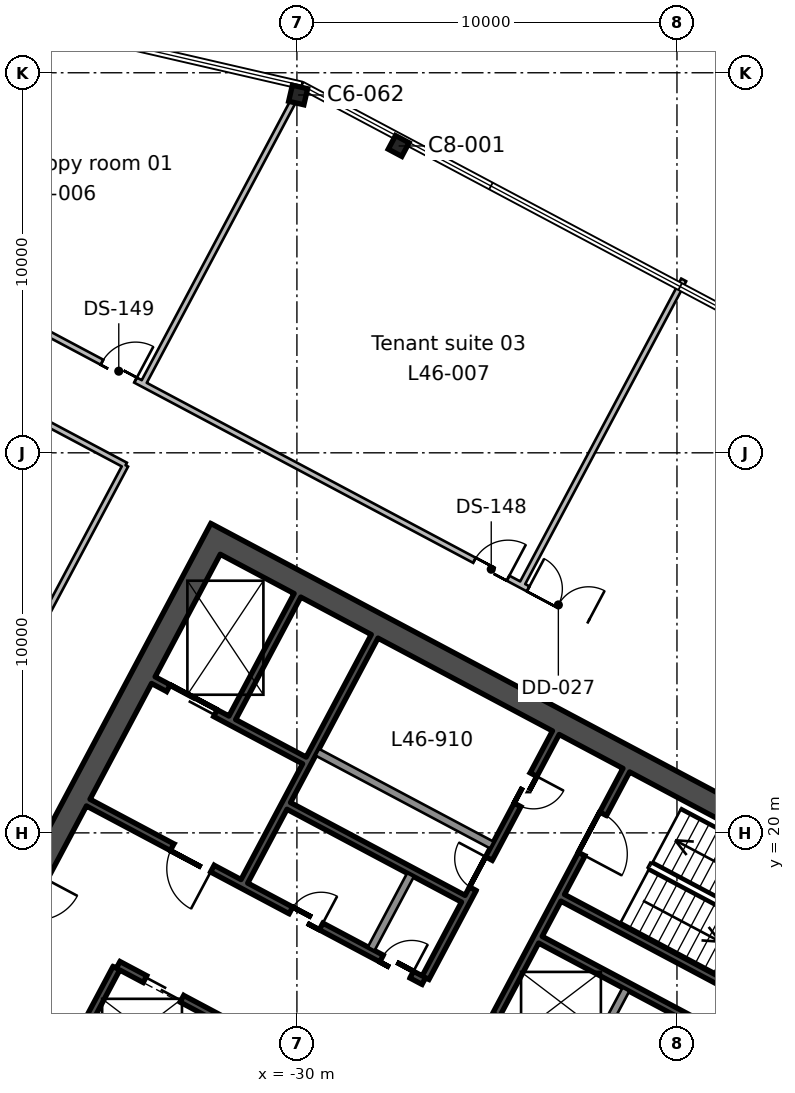
"""IFC4 building model, lengths in metres.
Left out: names, types, materials, properties, quantities, classifications, styles, units other than length and angle.
Written with IfcOpenShell. Run it as: python <this file> out.ifc"""

import sys

from ifc_helpers import new_model, si_unit, direction, frame, frame_2d, origin, origin_2d, place, context, subcontext, project, spatial, rectangle, i_section, extrude, element, fill, save


model = new_model("IFC4")
c1 = context("Model", 3, precision=1e-05, world=origin(), true_north=direction((0.0, 1.0)))
c2 = subcontext(c1, "Body", "Model", "MODEL_VIEW")
j1 = project(units=[si_unit("LENGTHUNIT", "METRE"), si_unit("PLANEANGLEUNIT", "RADIAN")], contexts=[c1])
p1 = place(None, origin())
s1 = spatial("IfcSite", under=j1, at=p1, CompositionType="ELEMENT")
p2 = place(p1, origin())
s2 = spatial("IfcBuilding", under=s1, at=p2, CompositionType="ELEMENT")
p3 = place(p2, frame((0.0, 0.0, 213.0)))
s3 = spatial("IfcBuildingStorey", under=s2, at=p3, CompositionType="ELEMENT", Elevation=213.0)
p4 = place(p3, frame((-27.323, 38.074, 0.0), z_axis=(0.0, 0.0, 1.0), x_axis=(-0.882947592859, 0.469471562786, 0.0)))
e1 = element("IfcColumn", 1, at=p4, inside=s3, PredefinedType="COLUMN", context=c2, shape_type="SweptSolid", body=[
    extrude(i_section(OverallWidth=0.404, OverallDepth=0.406, WebThickness=0.027, FlangeThickness=0.044, FilletRadius=0.015, at=origin_2d()), origin(), (0.0, 0.0, 1.0), 3.9),
])
p5 = place(p3, frame((-29.968, 39.415, 0.0), z_axis=(0.0, 0.0, 1.0), x_axis=(-0.974370064785, 0.224951054344, 0.0)))
e2 = element("IfcColumn", 2, at=p5, inside=s3, PredefinedType="COLUMN", context=c2, shape_type="SweptSolid", body=[
    extrude(i_section(OverallWidth=0.412, OverallDepth=0.434, WebThickness=0.036, FlangeThickness=0.057, FilletRadius=0.015, at=origin_2d()), origin(), (0.0, 0.0, 1.0), 3.9),
])
p6 = place(p3, frame((-13.635, 18.236, 0.0), z_axis=(0.0, 0.0, 1.0), x_axis=(-0.469478769487, -0.88294376095, 0.0)))
e3 = element("IfcWall", 3, at=p6, inside=s3, PredefinedType="SHEAR", context=c2, shape_type="SweptSolid", body=[
    extrude(rectangle(XDim=19.4, YDim=0.6, at=frame_2d((9.7, 0.0))), origin(), (0.0, 0.0, 1.0), 3.9),
])
p7 = place(p6, frame((6.7, 0.0, 0.0)))
e4 = element("IfcOpeningElement", 4, at=p7, cuts=e3, PredefinedType="OPENING", context=c2, shape_type="SweptSolid", body=[
    extrude(rectangle(XDim=2.4, YDim=2.4, at=frame_2d((1.2, 1.2))), frame((0.0, 0.31, 0.0), z_axis=(0.0, -1.0, 0.0), x_axis=(1.0, 0.0, 0.0)), (0.0, 0.0, 1.0), 0.62),
])
p8 = place(p3, frame((-32.0, 28.001, 0.0), z_axis=(0.0, 0.0, 1.0), x_axis=(-0.469468958625, -0.882948977511, 0.0)))
e5 = element("IfcWall", 5, at=p8, inside=s3, PredefinedType="SHEAR", context=c2, shape_type="SweptSolid", body=[
    extrude(rectangle(XDim=19.4, YDim=0.6, at=frame_2d((9.7, 0.0))), origin(), (0.0, 0.0, 1.0), 3.9),
])
p9 = place(p8, frame((10.3, 0.0, 0.0)))
e6 = element("IfcOpeningElement", 6, at=p9, cuts=e5, PredefinedType="OPENING", context=c2, shape_type="SweptSolid", body=[
    extrude(rectangle(XDim=2.4, YDim=2.4, at=frame_2d((1.2, 1.2))), frame((0.0, 0.31, 0.0), z_axis=(0.0, -1.0, 0.0), x_axis=(1.0, 0.0, 0.0)), (0.0, 0.0, 1.0), 0.62),
])
p10 = place(p3, frame((-14.041, 18.112, 0.0), z_axis=(0.0, 0.0, 1.0), x_axis=(-0.882947755831, 0.46947125628, 0.0)))
e7 = element("IfcWall", 7, at=p10, inside=s3, PredefinedType="SHEAR", context=c2, shape_type="SweptSolid", body=[
    extrude(rectangle(XDim=20.2, YDim=0.6, at=frame_2d((10.1, 0.0))), origin(), (0.0, 0.0, 1.0), 3.9),
])
p11 = place(p3, frame((-21.344, 15.879, 0.0), z_axis=(0.0, 0.0, 1.0), x_axis=(-0.4694473164, -0.882960484464, 0.0)))
e8 = element("IfcWall", 8, at=p11, inside=s3, PredefinedType="SOLIDWALL", context=c2, shape_type="SweptSolid", body=[
    extrude(rectangle(XDim=2.2, YDim=0.2, at=frame_2d((1.1, 0.0))), origin(), (0.0, 0.0, 1.0), 3.9),
])
p12 = place(p3, frame((-21.333, 21.649, 0.0), z_axis=(0.0, 0.0, 1.0), x_axis=(-0.469494272526, -0.882935517501, 0.0)))
e9 = element("IfcWall", 9, at=p12, inside=s3, PredefinedType="SHEAR", context=c2, shape_type="SweptSolid", body=[
    extrude(rectangle(XDim=7.3, YDim=0.2, at=frame_2d((3.65, 0.0))), origin(), (0.0, 0.0, 1.0), 3.9),
])
p13 = place(p12, frame((1.3, 0.0, 0.0)))
e10 = element("IfcOpeningElement", 10, at=p13, cuts=e9, PredefinedType="OPENING", context=c2, shape_type="SweptSolid", body=[
    extrude(rectangle(XDim=1.2, YDim=2.1, at=frame_2d((0.6, 1.05))), frame((0.0, 0.11, 0.0), z_axis=(0.0, -1.0, 0.0), x_axis=(1.0, 0.0, 0.0)), (0.0, 0.0, 1.0), 0.22),
])
p14 = place(p3, frame((-23.188, 22.635, 0.0), z_axis=(0.0, 0.0, 1.0), x_axis=(-0.469454336211, -0.882956752176, 0.0)))
e11 = element("IfcWall", 11, at=p14, inside=s3, PredefinedType="SHEAR", context=c2, shape_type="SweptSolid", body=[
    extrude(rectangle(XDim=7.3, YDim=0.2, at=frame_2d((3.65, 0.0))), origin(), (0.0, 0.0, 1.0), 3.9),
])
p15 = place(p14, frame((1.25, 0.0, 0.0)))
e12 = element("IfcOpeningElement", 12, at=p15, cuts=e11, PredefinedType="OPENING", context=c2, shape_type="SweptSolid", body=[
    extrude(rectangle(XDim=0.9, YDim=2.1, at=frame_2d((0.45, 1.05))), frame((0.0, 0.11, 0.0), z_axis=(0.0, -1.0, 0.0), x_axis=(1.0, 0.0, 0.0)), (0.0, 0.0, 1.0), 0.22),
])
p16 = place(p14, frame((3.75, 0.0, 0.0)))
e13 = element("IfcOpeningElement", 13, at=p16, cuts=e11, PredefinedType="OPENING", context=c2, shape_type="SweptSolid", body=[
    extrude(rectangle(XDim=0.9, YDim=2.1, at=frame_2d((0.45, 1.05))), frame((0.0, 0.11, 0.0), z_axis=(0.0, -1.0, 0.0), x_axis=(1.0, 0.0, 0.0)), (0.0, 0.0, 1.0), 0.22),
])
p17 = place(p3, frame((-27.012, 18.893, 0.0), z_axis=(0.0, 0.0, 1.0), x_axis=(-0.4694473164, -0.882960484464, 0.0)))
e14 = element("IfcWall", 14, at=p17, inside=s3, PredefinedType="SOLIDWALL", context=c2, shape_type="SweptSolid", body=[
    extrude(rectangle(XDim=2.2, YDim=0.2, at=frame_2d((1.1, 0.0))), origin(), (0.0, 0.0, 1.0), 3.9),
])
p18 = place(p3, frame((-27.955, 25.171, 0.0), z_axis=(0.0, 0.0, 1.0), x_axis=(-0.469480409012, -0.88294288918, 0.0)))
e15 = element("IfcWall", 15, at=p18, inside=s3, PredefinedType="SHEAR", context=c2, shape_type="SweptSolid", body=[
    extrude(rectangle(XDim=7.3, YDim=0.2, at=frame_2d((3.65, 0.0))), origin(), (0.0, 0.0, 1.0), 3.9),
])
p19 = place(p3, frame((-34.75, 16.438, 0.0), z_axis=(0.0, 0.0, 1.0), x_axis=(-0.469401318492, -0.882984938828, 0.0)))
e16 = element("IfcWall", 16, at=p19, inside=s3, PredefinedType="SHEAR", context=c2, shape_type="SweptSolid", body=[
    extrude(rectangle(XDim=2.2, YDim=0.2, at=frame_2d((1.1, 0.0))), origin(), (0.0, 0.0, 1.0), 3.9),
])
p20 = place(p3, frame((-29.986, 26.25, 0.0), z_axis=(0.0, 0.0, 1.0), x_axis=(-0.469494272526, -0.882935517501, 0.0)))
e17 = element("IfcWall", 17, at=p20, inside=s3, PredefinedType="SHEAR", context=c2, shape_type="SweptSolid", body=[
    extrude(rectangle(XDim=3.65, YDim=0.2, at=frame_2d((1.825, 0.0))), origin(), (0.0, 0.0, 1.0), 3.9),
])
p21 = place(p3, frame((-24.872, 19.68, 0.0), z_axis=(0.0, 0.0, 1.0), x_axis=(-0.882953967957, 0.469459572775, 0.0)))
e18 = element("IfcWall", 18, at=p21, inside=s3, PredefinedType="SOLIDWALL", context=c2, shape_type="SweptSolid", body=[
    extrude(rectangle(XDim=5.2, YDim=0.2, at=frame_2d((2.6, 0.0))), origin(), (0.0, 0.0, 1.0), 3.9),
])
p22 = place(p3, frame((-15.942, 14.536, 0.0), z_axis=(0.0, 0.0, 1.0), x_axis=(-0.882946947542, 0.469472776449, 0.0)))
e19 = element("IfcWall", 19, at=p22, inside=s3, PredefinedType="SHEAR", context=c2, shape_type="SweptSolid", body=[
    extrude(rectangle(XDim=8.0, YDim=0.2, at=frame_2d((4.0, 0.0))), origin(), (0.0, 0.0, 1.0), 3.9),
])
p23 = place(p3, frame((-29.804, 21.906, 0.0), z_axis=(0.0, 0.0, 1.0), x_axis=(-0.882960433586, 0.469447412093, 0.0)))
e20 = element("IfcWall", 20, at=p23, inside=s3, PredefinedType="SHEAR", context=c2, shape_type="SweptSolid", body=[
    extrude(rectangle(XDim=4.5, YDim=0.2, at=frame_2d((2.25, 0.0))), origin(), (0.0, 0.0, 1.0), 3.9),
])
p24 = place(p23, frame((2.65, 0.0, 0.0)))
e21 = element("IfcOpeningElement", 21, at=p24, cuts=e20, PredefinedType="OPENING", context=c2, shape_type="SweptSolid", body=[
    extrude(rectangle(XDim=1.4, YDim=2.4, at=frame_2d((0.7, 1.2))), frame((0.0, 0.11, 0.0), z_axis=(0.0, -1.0, 0.0), x_axis=(1.0, 0.0, 0.0)), (0.0, 0.0, 1.0), 0.22),
])
p25 = place(p3, frame((-16.529, 13.432, 0.0), z_axis=(0.0, 0.0, 1.0), x_axis=(-0.88295287151, 0.469461634952, 0.0)))
e22 = element("IfcWall", 22, at=p25, inside=s3, PredefinedType="SHEAR", context=c2, shape_type="SweptSolid", body=[
    extrude(rectangle(XDim=8.0, YDim=0.2, at=frame_2d((4.0, 0.0))), origin(), (0.0, 0.0, 1.0), 3.9),
])
p26 = place(p3, frame((-25.623, 18.268, 0.0), z_axis=(0.0, 0.0, 1.0), x_axis=(-0.882953967957, 0.469459572775, 0.0)))
e23 = element("IfcWall", 23, at=p26, inside=s3, PredefinedType="SHEAR", context=c2, shape_type="SweptSolid", body=[
    extrude(rectangle(XDim=5.2, YDim=0.2, at=frame_2d((2.6, 0.0))), origin(), (0.0, 0.0, 1.0), 3.9),
])
p27 = place(p3, frame((-26.662, 16.102, 0.0), z_axis=(0.0, 0.0, 1.0), x_axis=(-0.882940221191, 0.469485426614, 0.0)))
e24 = element("IfcWall", 24, at=p27, inside=s3, PredefinedType="SHEAR", context=c2, shape_type="SweptSolid", body=[
    extrude(rectangle(XDim=10.0, YDim=0.2, at=frame_2d((5.0, 0.0))), origin(), (0.0, 0.0, 1.0), 3.9),
])
p28 = place(p27, frame((6.3, 0.0, 0.0)))
e25 = element("IfcOpeningElement", 25, at=p28, cuts=e24, PredefinedType="OPENING", context=c2, shape_type="SweptSolid", body=[
    extrude(rectangle(XDim=1.2, YDim=2.1, at=frame_2d((0.6, 1.05))), frame((0.0, 0.11, 0.0), z_axis=(0.0, -1.0, 0.0), x_axis=(1.0, 0.0, 0.0)), (0.0, 0.0, 1.0), 0.22),
])
p29 = place(p27, frame((0.36, 0.0, 0.0)))
e26 = element("IfcOpeningElement", 26, at=p29, cuts=e24, PredefinedType="OPENING", context=c2, shape_type="SweptSolid", body=[
    extrude(rectangle(XDim=0.9, YDim=2.1, at=frame_2d((0.45, 1.05))), frame((0.0, 0.11, 0.0), z_axis=(0.0, -1.0, 0.0), x_axis=(1.0, 0.0, 0.0)), (0.0, 0.0, 1.0), 0.22),
])
p30 = place(p27, frame((3.06, 0.0, 0.0)))
e27 = element("IfcOpeningElement", 27, at=p30, cuts=e24, PredefinedType="OPENING", context=c2, shape_type="SweptSolid", body=[
    extrude(rectangle(XDim=0.9, YDim=2.1, at=frame_2d((0.45, 1.05))), frame((0.0, 0.11, 0.0), z_axis=(0.0, -1.0, 0.0), x_axis=(1.0, 0.0, 0.0)), (0.0, 0.0, 1.0), 0.22),
])
p31 = place(p3, frame((-29.935, 13.991, 0.0), z_axis=(0.0, 0.0, 1.0), x_axis=(-0.882952937579, 0.469461510692, 0.0)))
e28 = element("IfcWall", 28, at=p31, inside=s3, PredefinedType="SHEAR", context=c2, shape_type="SweptSolid", body=[
    extrude(rectangle(XDim=5.4, YDim=0.2, at=frame_2d((2.7, 0.0))), origin(), (0.0, 0.0, 1.0), 3.9),
])
p32 = place(p31, frame((0.8, 0.0, 0.0)))
e29 = element("IfcOpeningElement", 29, at=p32, cuts=e28, PredefinedType="OPENING", context=c2, shape_type="SweptSolid", body=[
    extrude(rectangle(XDim=1.1, YDim=2.1, at=frame_2d((0.55, 1.05))), frame((0.0, 0.11, 0.0), z_axis=(0.0, -1.0, 0.0), x_axis=(1.0, 0.0, 0.0)), (0.0, 0.0, 1.0), 0.22),
])
p33 = place(p31, frame((3.5, 0.0, 0.0)))
e30 = element("IfcOpeningElement", 30, at=p33, cuts=e28, PredefinedType="OPENING", context=c2, shape_type="SweptSolid", body=[
    extrude(rectangle(XDim=1.1, YDim=2.1, at=frame_2d((0.55, 1.05))), frame((0.0, 0.11, 0.0), z_axis=(0.0, -1.0, 0.0), x_axis=(1.0, 0.0, 0.0)), (0.0, 0.0, 1.0), 0.22),
])
p34 = place(p3, frame((-31.15, 11.919, 0.0), z_axis=(0.0, 0.0, 1.0), x_axis=(-0.882940221191, 0.469485426614, 0.0)))
e31 = element("IfcWall", 31, at=p34, inside=s3, PredefinedType="SHEAR", context=c2, shape_type="SweptSolid", body=[
    extrude(rectangle(XDim=8.0, YDim=0.2, at=frame_2d((4.0, 0.0))), origin(), (0.0, 0.0, 1.0), 3.9),
])
p35 = place(p3, frame((-41.921, 15.733, 0.0), z_axis=(0.0, 0.0, 1.0), x_axis=(0.469481161914, 0.882942488845, 0.0)))
e32 = element("IfcWall", 32, at=p35, inside=s3, PredefinedType="PARTITIONING", context=c2, shape_type="SweptSolid", body=[
    extrude(rectangle(XDim=15.79, YDim=0.15, at=frame_2d((7.895, 0.0))), origin(), (0.0, 0.0, 1.0), 3.54),
])
p36 = place(p35, frame((7.35, 0.0, 0.0)))
e33 = element("IfcOpeningElement", 33, at=p36, cuts=e32, PredefinedType="OPENING", context=c2, shape_type="SweptSolid", body=[
    extrude(rectangle(XDim=1.0, YDim=2.1, at=frame_2d((0.5, 1.05))), frame((0.0, 0.085, 0.0), z_axis=(0.0, -1.0, 0.0), x_axis=(1.0, 0.0, 0.0)), (0.0, 0.0, 1.0), 0.17),
])
p37 = place(p35, frame((4.45, 0.0, 0.0)))
e34 = element("IfcOpeningElement", 34, at=p37, cuts=e32, PredefinedType="OPENING", context=c2, shape_type="SweptSolid", body=[
    extrude(rectangle(XDim=1.0, YDim=2.1, at=frame_2d((0.5, 1.05))), frame((0.0, 0.085, 0.0), z_axis=(0.0, -1.0, 0.0), x_axis=(1.0, 0.0, 0.0)), (0.0, 0.0, 1.0), 0.17),
])
p38 = place(p3, frame((-34.508, 29.674, 0.0), z_axis=(0.0, 0.0, 1.0), x_axis=(-0.882947928049, 0.469470932384, 0.0)))
e35 = element("IfcWall", 35, at=p38, inside=s3, PredefinedType="PARTITIONING", context=c2, shape_type="SweptSolid", body=[
    extrude(rectangle(XDim=19.128, YDim=0.15, at=frame_2d((9.564, 0.0))), origin(), (0.0, 0.0, 1.0), 3.54),
])
p39 = place(p3, frame((-48.947, 39.73, 0.0), z_axis=(0.0, 0.0, 1.0), x_axis=(0.882945454821, -0.469475583828, 0.0)))
e36 = element("IfcWall", 36, at=p39, inside=s3, PredefinedType="PARTITIONING", context=c2, shape_type="SweptSolid", body=[
    extrude(rectangle(XDim=55.436, YDim=0.15, at=frame_2d((27.718, 0.0))), origin(), (0.0, 0.0, 1.0), 3.54),
])
p40 = place(p39, frame((28.35, 0.0, 0.0)))
e37 = element("IfcOpeningElement", 37, at=p40, cuts=e36, PredefinedType="OPENING", context=c2, shape_type="SweptSolid", body=[
    extrude(rectangle(XDim=1.8, YDim=2.1, at=frame_2d((0.9, 1.05))), frame((0.0, 0.085, 0.0), z_axis=(0.0, -1.0, 0.0), x_axis=(1.0, 0.0, 0.0)), (0.0, 0.0, 1.0), 0.17),
])
p41 = place(p39, frame((26.75, 0.0, 0.0)))
e38 = element("IfcOpeningElement", 38, at=p41, cuts=e36, PredefinedType="OPENING", context=c2, shape_type="SweptSolid", body=[
    extrude(rectangle(XDim=1.0, YDim=2.1, at=frame_2d((0.5, 1.05))), frame((0.0, 0.085, 0.0), z_axis=(0.0, -1.0, 0.0), x_axis=(1.0, 0.0, 0.0)), (0.0, 0.0, 1.0), 0.17),
])
p42 = place(p39, frame((15.65, 0.0, 0.0)))
e39 = element("IfcOpeningElement", 39, at=p42, cuts=e36, PredefinedType="OPENING", context=c2, shape_type="SweptSolid", body=[
    extrude(rectangle(XDim=1.0, YDim=2.1, at=frame_2d((0.5, 1.05))), frame((0.0, 0.085, 0.0), z_axis=(0.0, -1.0, 0.0), x_axis=(1.0, 0.0, 0.0)), (0.0, 0.0, 1.0), 0.17),
])
p43 = place(p3, frame((-30.11, 39.225, 0.0), z_axis=(0.0, 0.0, 1.0), x_axis=(-0.469401779971, -0.882984693502, 0.0)))
e40 = element("IfcWall", 40, at=p43, inside=s3, PredefinedType="PARTITIONING", context=c2, shape_type="SweptSolid", body=[
    extrude(rectangle(XDim=8.398, YDim=0.15, at=frame_2d((4.199, 0.0))), origin(), (0.0, 0.0, 1.0), 3.54),
])
p44 = place(p3, frame((-19.822, 34.55, 0.0), z_axis=(0.0, 0.0, 1.0), x_axis=(-0.46943766298, -0.882965616871, 0.0)))
e41 = element("IfcWall", 41, at=p44, inside=s3, PredefinedType="PARTITIONING", context=c2, shape_type="SweptSolid", body=[
    extrude(rectangle(XDim=9.1, YDim=0.15, at=frame_2d((4.55, 0.0))), origin(), (0.0, 0.0, 1.0), 3.54),
])
p45 = place(p3, frame((-20.235, -0.567, 0.0), z_axis=(0.0, 0.0, 1.0), x_axis=(0.469499398982, 0.882932791528, 0.0)))
e42 = element("IfcWall", 42, at=p45, inside=s3, PredefinedType="PARTITIONING", context=c2, shape_type="SweptSolid", body=[
    extrude(rectangle(XDim=20.0, YDim=0.15, at=frame_2d((10.0, 0.0))), origin(), (0.0, 0.0, 1.0), 3.54),
])
p46 = place(p45, frame((9.55, 0.0, 0.0)))
e43 = element("IfcOpeningElement", 43, at=p46, cuts=e42, PredefinedType="OPENING", context=c2, shape_type="SweptSolid", body=[
    extrude(rectangle(XDim=1.0, YDim=2.1, at=frame_2d((0.5, 1.05))), frame((0.0, 0.085, 0.0), z_axis=(0.0, -1.0, 0.0), x_axis=(1.0, 0.0, 0.0)), (0.0, 0.0, 1.0), 0.17),
])
p47 = place(p28, origin())
e44 = element("IfcDoor", 44, at=p47, inside=s3, OperationType="SINGLE_SWING_LEFT", PredefinedType="DOOR", context=c2, shape_type="SweptSolid", body=[
    extrude(rectangle(XDim=1.2, YDim=2.1, at=frame_2d((0.6, 1.05))), frame((0.0, 0.025, 0.0), z_axis=(0.0, -1.0, 0.0), x_axis=(1.0, 0.0, 0.0)), (0.0, 0.0, 1.0), 0.05),
])
fill(e25, e44)
p48 = place(p13, origin())
e45 = element("IfcDoor", 45, at=p48, inside=s3, OperationType="SINGLE_SWING_RIGHT", PredefinedType="DOOR", context=c2, shape_type="SweptSolid", body=[
    extrude(rectangle(XDim=1.2, YDim=2.1, at=frame_2d((0.6, 1.05))), frame((0.0, 0.025, 0.0), z_axis=(0.0, -1.0, 0.0), x_axis=(1.0, 0.0, 0.0)), (0.0, 0.0, 1.0), 0.05),
])
fill(e10, e45)
p49 = place(p29, frame((0.9, 0.0, 0.0), z_axis=(0.0, 0.0, 1.0), x_axis=(-1.0, 0.0, 0.0)))
e46 = element("IfcDoor", 46, at=p49, inside=s3, OperationType="SINGLE_SWING_RIGHT", PredefinedType="DOOR", context=c2, shape_type="SweptSolid", body=[
    extrude(rectangle(XDim=0.9, YDim=2.1, at=frame_2d((0.45, 1.05))), frame((0.0, 0.025, 0.0), z_axis=(0.0, -1.0, 0.0), x_axis=(1.0, 0.0, 0.0)), (0.0, 0.0, 1.0), 0.05),
])
fill(e26, e46)
p50 = place(p30, frame((0.9, 0.0, 0.0), z_axis=(0.0, 0.0, 1.0), x_axis=(-1.0, 0.0, 0.0)))
e47 = element("IfcDoor", 47, at=p50, inside=s3, OperationType="SINGLE_SWING_RIGHT", PredefinedType="DOOR", context=c2, shape_type="SweptSolid", body=[
    extrude(rectangle(XDim=0.9, YDim=2.1, at=frame_2d((0.45, 1.05))), frame((0.0, 0.025, 0.0), z_axis=(0.0, -1.0, 0.0), x_axis=(1.0, 0.0, 0.0)), (0.0, 0.0, 1.0), 0.05),
])
fill(e27, e47)
p51 = place(p33, origin())
e48 = element("IfcDoor", 48, at=p51, inside=s3, OperationType="DOUBLE_DOOR_SLIDING", PredefinedType="DOOR", context=c2, shape_type="SweptSolid", body=[
    extrude(rectangle(XDim=1.1, YDim=2.1, at=frame_2d((0.55, 1.05))), frame((0.0, 0.025, 0.0), z_axis=(0.0, -1.0, 0.0), x_axis=(1.0, 0.0, 0.0)), (0.0, 0.0, 1.0), 0.05),
])
fill(e30, e48)
p52 = place(p24, origin())
e49 = element("IfcDoor", 49, at=p52, inside=s3, OperationType="DOUBLE_DOOR_SLIDING", PredefinedType="DOOR", context=c2, shape_type="SweptSolid", body=[
    extrude(rectangle(XDim=1.4, YDim=2.4, at=frame_2d((0.7, 1.2))), frame((0.0, 0.025, 0.0), z_axis=(0.0, -1.0, 0.0), x_axis=(1.0, 0.0, 0.0)), (0.0, 0.0, 1.0), 0.05),
])
fill(e21, e49)
p53 = place(p15, origin())
e50 = element("IfcDoor", 50, at=p53, inside=s3, OperationType="SINGLE_SWING_LEFT", PredefinedType="DOOR", context=c2, shape_type="SweptSolid", body=[
    extrude(rectangle(XDim=0.9, YDim=2.1, at=frame_2d((0.45, 1.05))), frame((0.0, 0.025, 0.0), z_axis=(0.0, -1.0, 0.0), x_axis=(1.0, 0.0, 0.0)), (0.0, 0.0, 1.0), 0.05),
])
fill(e12, e50)
p54 = place(p16, frame((0.9, 0.0, 0.0), z_axis=(0.0, 0.0, 1.0), x_axis=(-1.0, 0.0, 0.0)))
e51 = element("IfcDoor", 51, at=p54, inside=s3, OperationType="SINGLE_SWING_RIGHT", PredefinedType="DOOR", context=c2, shape_type="SweptSolid", body=[
    extrude(rectangle(XDim=0.9, YDim=2.1, at=frame_2d((0.45, 1.05))), frame((0.0, 0.025, 0.0), z_axis=(0.0, -1.0, 0.0), x_axis=(1.0, 0.0, 0.0)), (0.0, 0.0, 1.0), 0.05),
])
fill(e13, e51)
p55 = place(p40, origin())
e52 = element("IfcDoor", 52, at=p55, inside=s3, OperationType="DOUBLE_DOOR_SINGLE_SWING", PredefinedType="DOOR", context=c2, shape_type="SweptSolid", body=[
    extrude(rectangle(XDim=1.8, YDim=2.1, at=frame_2d((0.9, 1.05))), frame((0.0, 0.025, 0.0), z_axis=(0.0, -1.0, 0.0), x_axis=(1.0, 0.0, 0.0)), (0.0, 0.0, 1.0), 0.05),
])
fill(e37, e52)
p56 = place(p41, origin())
e53 = element("IfcDoor", 53, at=p56, inside=s3, OperationType="SINGLE_SWING_RIGHT", PredefinedType="DOOR", context=c2, shape_type="SweptSolid", body=[
    extrude(rectangle(XDim=1.0, YDim=2.1, at=frame_2d((0.5, 1.05))), frame((0.0, 0.025, 0.0), z_axis=(0.0, -1.0, 0.0), x_axis=(1.0, 0.0, 0.0)), (0.0, 0.0, 1.0), 0.05),
])
fill(e38, e53)
p57 = place(p42, origin())
e54 = element("IfcDoor", 54, at=p57, inside=s3, OperationType="SINGLE_SWING_RIGHT", PredefinedType="DOOR", context=c2, shape_type="SweptSolid", body=[
    extrude(rectangle(XDim=1.0, YDim=2.1, at=frame_2d((0.5, 1.05))), frame((0.0, 0.025, 0.0), z_axis=(0.0, -1.0, 0.0), x_axis=(1.0, 0.0, 0.0)), (0.0, 0.0, 1.0), 0.05),
])
fill(e39, e54)
save(model, sys.argv[1])
